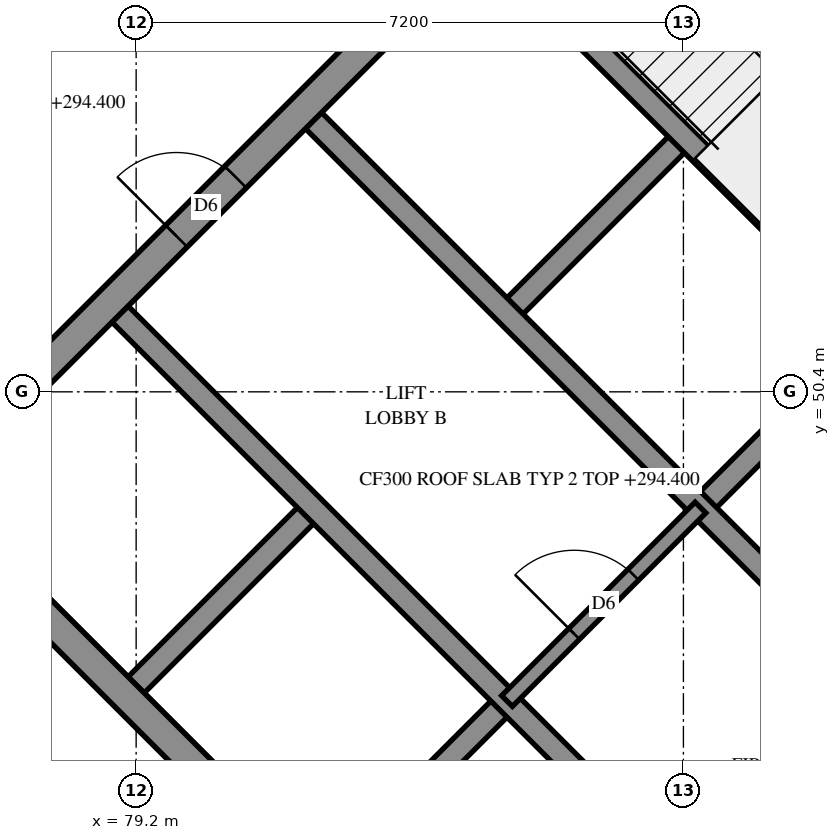
"""IFC4 building model, lengths in metres.
Left out: names, types, materials, properties, quantities, classifications, styles, units other than length and angle.
Written with IfcOpenShell. Run it as: python <this file> out.ifc"""

import sys

from ifc_helpers import new_model, si_unit, direction, frame, frame_2d, origin, place, context, subcontext, project, spatial, polyline, rectangle, outline, extrude, element, fill, save


model = new_model("IFC4")
c1 = context("Model", 3, precision=1e-05, world=origin(), true_north=direction((0.0, 1.0)))
c2 = subcontext(c1, "Body", "Model", "MODEL_VIEW")
j1 = project(units=[si_unit("LENGTHUNIT", "METRE"), si_unit("PLANEANGLEUNIT", "RADIAN")], contexts=[c1])
p1 = place(None, origin())
s1 = spatial("IfcSite", under=j1, at=p1, CompositionType="ELEMENT")
p2 = place(p1, origin())
s2 = spatial("IfcBuilding", under=s1, at=p2, CompositionType="ELEMENT")
p3 = place(p2, frame((0.0, 0.0, 294.4)))
s3 = spatial("IfcBuildingStorey", under=s2, at=p3, CompositionType="ELEMENT", Elevation=294.4)
p4 = place(p3, frame((76.23, 49.231, -0.3), z_axis=(0.0, 0.0, 1.0), x_axis=(0.7071034917, -0.7071100706, 0.0)))
e1 = element("IfcWall", 1, at=p4, inside=s3, PredefinedType="SHEAR", context=c2, shape_type="SweptSolid", body=[
    extrude(outline(polyline([(0.0, 0.0), (15.2, 0.0), (15.2, 3.1), (0.0, 3.1), (0.0, 0.0)])), frame((0.0, 0.2, 0.0), z_axis=(0.0, -1.0, 0.0), x_axis=(1.0, 0.0, 0.0)), (0.0, 0.0, 1.0), 0.4),
])
p5 = place(p3, frame((86.695, 59.696, -0.3), z_axis=(0.0, 0.0, 1.0), x_axis=(0.7071100706, -0.7071034917, 0.0)))
e2 = element("IfcWall", 2, at=p5, inside=s3, PredefinedType="SHEAR", context=c2, shape_type="SweptSolid", body=[
    extrude(outline(polyline([(0.0, 0.0), (15.2, 0.0), (15.2, 3.1), (0.0, 3.1), (0.0, 0.0)])), frame((0.0, 0.2, 0.0), z_axis=(0.0, -1.0, 0.0), x_axis=(1.0, 0.0, 0.0)), (0.0, 0.0, 1.0), 0.4),
])
p6 = place(p5, frame((10.4, 0.0, 0.3)))
e3 = element("IfcOpeningElement", 3, at=p6, cuts=e2, PredefinedType="OPENING", context=c2, shape_type="SweptSolid", body=[
    extrude(rectangle(XDim=0.8, YDim=2.1, at=frame_2d((0.4, 1.05))), frame((0.0, 0.21, 0.0), z_axis=(0.0, -1.0, 0.0), x_axis=(1.0, 0.0, 0.0)), (0.0, 0.0, 1.0), 0.42),
])
p7 = place(p3, frame((76.513, 49.231, -0.3), z_axis=(0.0, 0.0, 1.0), x_axis=(0.7071067812, 0.7071067812, 0.0)))
e4 = element("IfcWall", 4, at=p7, inside=s3, PredefinedType="SHEAR", context=c2, shape_type="SweptSolid", body=[
    extrude(outline(polyline([(0.0, 0.0), (14.4, 0.0), (14.4, 3.1), (0.0, 3.1), (0.0, 0.0)])), frame((0.0, 0.2, 0.0), z_axis=(0.0, -1.0, 0.0), x_axis=(1.0, 0.0, 0.0)), (0.0, 0.0, 1.0), 0.4),
])
p8 = place(p7, frame((4.55, 0.0, 0.3)))
e5 = element("IfcOpeningElement", 5, at=p8, cuts=e4, PredefinedType="OPENING", context=c2, shape_type="SweptSolid", body=[
    extrude(rectangle(XDim=1.1, YDim=2.1, at=frame_2d((0.55, 1.05))), frame((0.0, 0.21, 0.0), z_axis=(0.0, -1.0, 0.0), x_axis=(1.0, 0.0, 0.0)), (0.0, 0.0, 1.0), 0.42),
])
p9 = place(p7, frame((11.35, 0.0, 0.3)))
e6 = element("IfcOpeningElement", 6, at=p9, cuts=e4, PredefinedType="OPENING", context=c2, shape_type="SweptSolid", body=[
    extrude(rectangle(XDim=1.1, YDim=2.1, at=frame_2d((0.55, 1.05))), frame((0.0, 0.21, 0.0), z_axis=(0.0, -1.0, 0.0), x_axis=(1.0, 0.0, 0.0)), (0.0, 0.0, 1.0), 0.42),
])
p10 = place(p3, frame((86.978, 38.766, -0.3), z_axis=(0.0, 0.0, 1.0), x_axis=(0.7071067812, 0.7071067812, 0.0)))
e7 = element("IfcWall", 7, at=p10, inside=s3, PredefinedType="SHEAR", context=c2, shape_type="SweptSolid", body=[
    extrude(outline(polyline([(0.0, 0.0), (14.4, 0.0), (14.4, 3.1), (0.0, 3.1), (0.0, 0.0)])), frame((0.0, 0.2, 0.0), z_axis=(0.0, -1.0, 0.0), x_axis=(1.0, 0.0, 0.0)), (0.0, 0.0, 1.0), 0.4),
])
p11 = place(p10, frame((4.55, 0.0, 0.3)))
e8 = element("IfcOpeningElement", 8, at=p11, cuts=e7, PredefinedType="OPENING", context=c2, shape_type="SweptSolid", body=[
    extrude(rectangle(XDim=1.1, YDim=2.1, at=frame_2d((0.55, 1.05))), frame((0.0, 0.21, 0.0), z_axis=(0.0, -1.0, 0.0), x_axis=(1.0, 0.0, 0.0)), (0.0, 0.0, 1.0), 0.42),
])
p12 = place(p10, frame((11.35, 0.0, 0.3)))
e9 = element("IfcOpeningElement", 9, at=p12, cuts=e7, PredefinedType="OPENING", context=c2, shape_type="SweptSolid", body=[
    extrude(rectangle(XDim=1.1, YDim=2.1, at=frame_2d((0.55, 1.05))), frame((0.0, 0.21, 0.0), z_axis=(0.0, -1.0, 0.0), x_axis=(1.0, 0.0, 0.0)), (0.0, 0.0, 1.0), 0.42),
])
for number, where, z_axis, x_axis in (
    (10, (79.2, 46.544, 0.0), (0.0, 0.0, 1.0), (0.707, 0.707, 0.0)),
    (11, (84.079, 51.423, 0.0), (0.0, 0.0, 1.0), (0.707, 0.707, 0.0)),
):
    element("IfcWall", number, at=place(p3, frame(where, z_axis=z_axis, x_axis=x_axis)), inside=s3, PredefinedType="SOLIDWALL", context=c2, shape_type="SweptSolid", body=[
        extrude(outline(polyline([(0.0, 0.0), (3.3, 0.0), (3.3, 3.5), (0.0, 3.5), (0.0, 0.0)])), frame((0.0, 0.15, 0.0), z_axis=(0.0, -1.0, 0.0), x_axis=(1.0, 0.0, 0.0)), (0.0, 0.0, 1.0), 0.3),
    ])
p13 = place(p3, frame((81.746, 43.999, 0.0), z_axis=(0.0, 0.0, 1.0), x_axis=(0.7071067812, 0.7071067812, 0.0)))
e12 = element("IfcWall", 12, at=p13, inside=s3, PredefinedType="SOLIDWALL", context=c2, shape_type="SweptSolid", body=[
    extrude(outline(polyline([(0.0, 0.0), (3.3, 0.0), (3.3, 3.5), (0.0, 3.5), (0.0, 0.0)])), frame((0.0, 0.15, 0.0), z_axis=(0.0, -1.0, 0.0), x_axis=(1.0, 0.0, 0.0)), (0.0, 0.0, 1.0), 0.3),
])
p14 = place(p3, frame((86.625, 48.878, 0.0), z_axis=(0.0, 0.0, 1.0), x_axis=(0.7071067812, 0.7071067812, 0.0)))
e13 = element("IfcWall", 13, at=p14, inside=s3, PredefinedType="SOLIDWALL", context=c2, shape_type="SweptSolid", body=[
    extrude(outline(polyline([(0.0, 0.0), (3.3, 0.0), (3.3, 3.5), (0.0, 3.5), (0.0, 0.0)])), frame((0.0, 0.15, 0.0), z_axis=(0.0, -1.0, 0.0), x_axis=(1.0, 0.0, 0.0)), (0.0, 0.0, 1.0), 0.3),
])
p15 = place(p3, frame((78.988, 51.423, 0.0), z_axis=(0.0, 0.0, 1.0), x_axis=(0.7071067812, -0.7071067812, 0.0)))
e14 = element("IfcWall", 14, at=p15, inside=s3, PredefinedType="SOLIDWALL", context=c2, shape_type="SweptSolid", body=[
    extrude(outline(polyline([(0.0, 0.0), (14.4, 0.0), (14.4, 3.5), (0.0, 3.5), (0.0, 0.0)])), frame((0.0, 0.15, 0.0), z_axis=(0.0, -1.0, 0.0), x_axis=(1.0, 0.0, 0.0)), (0.0, 0.0, 1.0), 0.3),
])
p16 = place(p15, frame((12.05, 0.0, 0.0)))
e15 = element("IfcOpeningElement", 15, at=p16, cuts=e14, PredefinedType="OPENING", context=c2, shape_type="SweptSolid", body=[
    extrude(rectangle(XDim=1.1, YDim=2.1, at=frame_2d((0.55, 1.05))), frame((0.0, 0.16, 0.0), z_axis=(0.0, -1.0, 0.0), x_axis=(1.0, 0.0, 0.0)), (0.0, 0.0, 1.0), 0.32),
])
p17 = place(p3, frame((81.534, 53.969, 0.0), z_axis=(0.0, 0.0, 1.0), x_axis=(0.707103309, -0.7071102534, 0.0)))
e16 = element("IfcWall", 16, at=p17, inside=s3, PredefinedType="SOLIDWALL", context=c2, shape_type="SweptSolid", body=[
    extrude(outline(polyline([(0.0, 0.0), (14.4, 0.0), (14.4, 3.5), (0.0, 3.5), (0.0, 0.0)])), frame((0.0, 0.15, 0.0), z_axis=(0.0, -1.0, 0.0), x_axis=(1.0, 0.0, 0.0)), (0.0, 0.0, 1.0), 0.3),
])
p18 = place(p17, frame((12.05, 0.0, 0.0)))
e17 = element("IfcOpeningElement", 17, at=p18, cuts=e16, PredefinedType="OPENING", context=c2, shape_type="SweptSolid", body=[
    extrude(rectangle(XDim=1.1, YDim=2.1, at=frame_2d((0.55, 1.05))), frame((0.0, 0.16, 0.0), z_axis=(0.0, -1.0, 0.0), x_axis=(1.0, 0.0, 0.0)), (0.0, 0.0, 1.0), 0.32),
])
p19 = place(p3, frame((83.867, 56.302, 0.0), z_axis=(0.0, 0.0, 1.0), x_axis=(0.7071137256, -0.7070998367, 0.0)))
e18 = element("IfcWall", 18, at=p19, inside=s3, PredefinedType="SOLIDWALL", context=c2, shape_type="SweptSolid", body=[
    extrude(outline(polyline([(0.0, 0.0), (7.2, 0.0), (7.2, 3.5), (0.0, 3.5), (0.0, 0.0)])), frame((0.0, 0.15, 0.0), z_axis=(0.0, -1.0, 0.0), x_axis=(1.0, 0.0, 0.0)), (0.0, 0.0, 1.0), 0.3),
])
p20 = place(p3, frame((84.079, 46.332, 0.0), z_axis=(0.0, 0.0, 1.0), x_axis=(0.7071067812, 0.7071067812, 0.0)))
e19 = element("IfcWall", 19, at=p20, inside=s3, PredefinedType="PARTITIONING", context=c2, shape_type="SweptSolid", body=[
    extrude(outline(polyline([(0.0, 0.0), (3.6, 0.0), (3.6, 3.5), (0.0, 3.5), (0.0, 0.0)])), frame((0.0, 0.1, 0.0), z_axis=(0.0, -1.0, 0.0), x_axis=(1.0, 0.0, 0.0)), (0.0, 0.0, 1.0), 0.2),
])
p21 = place(p20, frame((1.25, 0.0, 0.0)))
e20 = element("IfcOpeningElement", 20, at=p21, cuts=e19, PredefinedType="OPENING", context=c2, shape_type="SweptSolid", body=[
    extrude(rectangle(XDim=1.1, YDim=2.1, at=frame_2d((0.55, 1.05))), frame((0.0, 0.11, 0.0), z_axis=(0.0, -1.0, 0.0), x_axis=(1.0, 0.0, 0.0)), (0.0, 0.0, 1.0), 0.22),
])
p22 = place(p3, frame((86.833, 62.805, 0.0), z_axis=(0.0, 0.0, 1.0), x_axis=(0.7072045138, -0.7070090351, 0.0)))
e21 = element("IfcWall", 21, at=p22, inside=s3, PredefinedType="PARTITIONING", context=c2, shape_type="SweptSolid", body=[
    extrude(rectangle(XDim=13.301, YDim=0.2, at=frame_2d((6.65, 0.0))), origin(), (0.0, 0.0, 1.0), 3.5),
])
p23 = place(p22, frame((6.387, 0.0, 0.0)))
e22 = element("IfcOpeningElement", 22, at=p23, cuts=e21, PredefinedType="OPENING", context=c2, shape_type="SweptSolid", body=[
    extrude(rectangle(XDim=1.0, YDim=2.1, at=frame_2d((0.5, 1.05))), frame((0.0, 0.11, 0.0), z_axis=(0.0, -1.0, 0.0), x_axis=(1.0, 0.0, 0.0)), (0.0, 0.0, 1.0), 0.22),
])
p24 = place(p8, origin())
e23 = element("IfcDoor", 23, at=p24, inside=s3, OperationType="DOUBLE_DOOR_SINGLE_SWING", PredefinedType="DOOR", context=c2, shape_type="SweptSolid", body=[
    extrude(rectangle(XDim=1.1, YDim=2.1, at=frame_2d((0.55, 1.05))), frame((0.0, 0.025, 0.0), z_axis=(0.0, -1.0, 0.0), x_axis=(1.0, 0.0, 0.0)), (0.0, 0.0, 1.0), 0.05),
])
fill(e5, e23)
p25 = place(p21, origin())
e24 = element("IfcDoor", 24, at=p25, inside=s3, OperationType="DOUBLE_DOOR_SINGLE_SWING", PredefinedType="DOOR", context=c2, shape_type="SweptSolid", body=[
    extrude(rectangle(XDim=1.1, YDim=2.1, at=frame_2d((0.55, 1.05))), frame((0.0, 0.025, 0.0), z_axis=(0.0, -1.0, 0.0), x_axis=(1.0, 0.0, 0.0)), (0.0, 0.0, 1.0), 0.05),
])
fill(e20, e24)
save(model, sys.argv[1])
